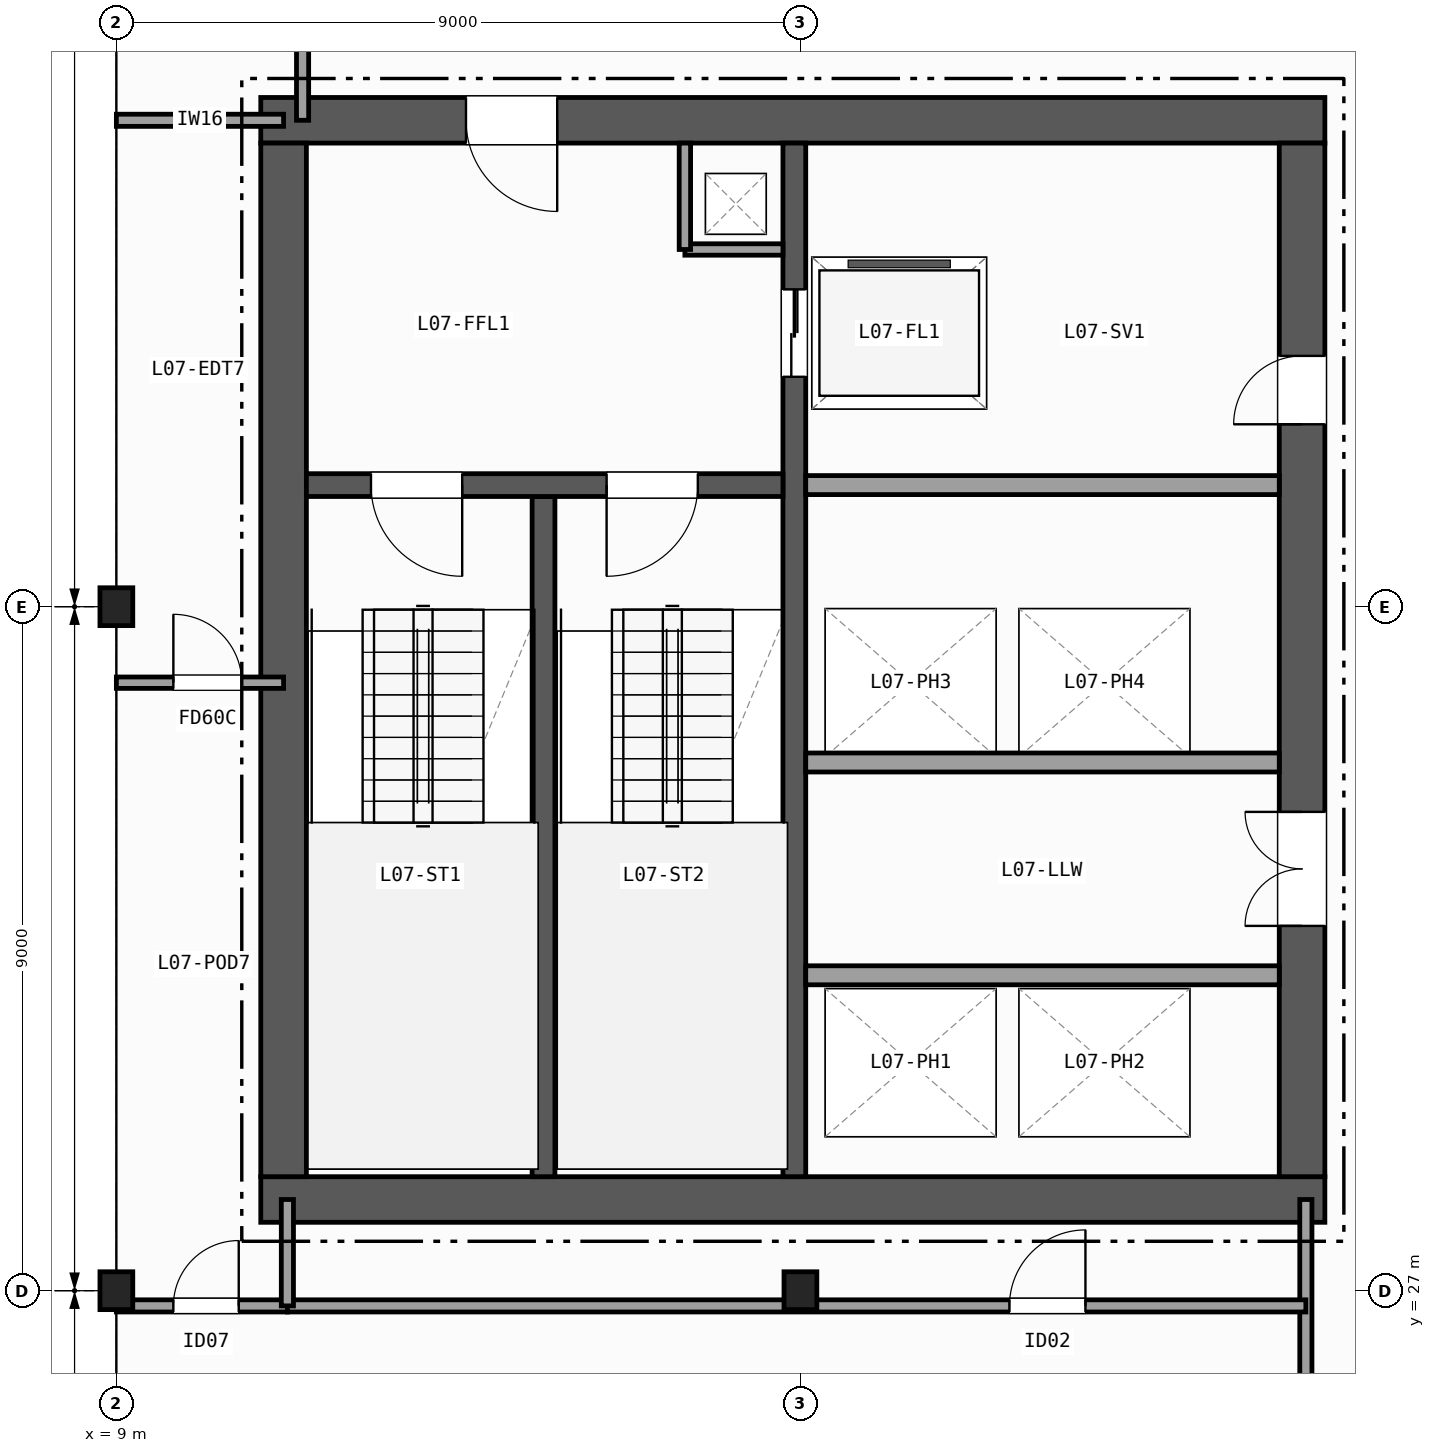
"""IFC4 building model, lengths in metres.
Left out: names, types, materials, properties, quantities, classifications, styles, units other than length and angle.
Written with IfcOpenShell. Run it as: python <this file> out.ifc"""

import sys

from ifc_helpers import new_model, si_unit, direction, frame, frame_2d, origin, origin_2d, place, context, subcontext, project, spatial, rectangle, i_section, extrude, element, fill, save


model = new_model("IFC4")
c1 = context("Model", 3, precision=1e-05, world=origin(), true_north=direction((0.0, 1.0)))
c2 = subcontext(c1, "Body", "Model", "MODEL_VIEW")
j1 = project(units=[si_unit("LENGTHUNIT", "METRE"), si_unit("PLANEANGLEUNIT", "RADIAN")], contexts=[c1])
p1 = place(None, origin())
s1 = spatial("IfcSite", under=j1, at=p1, CompositionType="ELEMENT")
p2 = place(p1, origin())
s2 = spatial("IfcBuilding", under=s1, at=p2, CompositionType="ELEMENT")
p3 = place(p2, frame((0.0, 0.0, 36.0)))
s3 = spatial("IfcBuildingStorey", under=s2, at=p3, CompositionType="ELEMENT", Elevation=36.0)
for number, where, z_axis, x_axis in (
    (1, (9.0, 27.0, 0.0), (0.0, 0.0, 1.0), (1.0, 0.0, 0.0)),
    (2, (9.0, 36.0, 0.0), (0.0, 0.0, 1.0), (1.0, 0.0, 0.0)),
    (3, (18.0, 27.0, 0.0), (0.0, 0.0, 1.0), (1.0, 0.0, 0.0)),
):
    element("IfcColumn", number, at=place(p3, frame(where, z_axis=z_axis, x_axis=x_axis)), inside=s3, PredefinedType="COLUMN", context=c2, shape_type="SweptSolid", body=[
        extrude(i_section(OverallWidth=0.432, OverallDepth=0.498, WebThickness=0.056, FlangeThickness=0.089, FilletRadius=0.015, at=origin_2d()), origin(), (0.0, 0.0, 1.0), 3.7),
    ])
p4 = place(p3, frame((10.9, 28.2, 0.0), z_axis=(0.0, 0.0, 1.0), x_axis=(1.0, 0.0, 0.0)))
e4 = element("IfcWall", 4, at=p4, inside=s3, PredefinedType="SHEAR", context=c2, shape_type="SweptSolid", body=[
    extrude(rectangle(XDim=14.0, YDim=0.6, at=frame_2d((7.0, 0.0))), origin(), (0.0, 0.0, 1.0), 3.42),
])
p5 = place(p3, frame((24.9, 42.4, 0.0), z_axis=(0.0, 0.0, 1.0), x_axis=(-1.0, 0.0, 0.0)))
e5 = element("IfcWall", 5, at=p5, inside=s3, PredefinedType="SHEAR", context=c2, shape_type="SweptSolid", body=[
    extrude(rectangle(XDim=14.0, YDim=0.6, at=frame_2d((7.0, 0.0))), origin(), (0.0, 0.0, 1.0), 3.42),
])
p6 = place(p5, frame((10.1, 0.0, 0.0)))
e6 = element("IfcOpeningElement", 6, at=p6, cuts=e5, PredefinedType="OPENING", context=c2, shape_type="SweptSolid", body=[
    extrude(rectangle(XDim=1.2, YDim=2.15, at=frame_2d((0.6, 1.075))), frame((0.0, 0.31, 0.0), z_axis=(0.0, -1.0, 0.0), x_axis=(1.0, 0.0, 0.0)), (0.0, 0.0, 1.0), 0.62),
])
p7 = place(p3, frame((11.2, 42.1, 0.0), z_axis=(0.0, 0.0, 1.0), x_axis=(0.0, -1.0, 0.0)))
e7 = element("IfcWall", 7, at=p7, inside=s3, PredefinedType="SHEAR", context=c2, shape_type="SweptSolid", body=[
    extrude(rectangle(XDim=13.6, YDim=0.6, at=frame_2d((6.8, 0.0))), origin(), (0.0, 0.0, 1.0), 3.42),
])
p8 = place(p3, frame((24.6, 28.5, 0.0), z_axis=(0.0, 0.0, 1.0), x_axis=(0.0, 1.0, 0.0)))
e8 = element("IfcWall", 8, at=p8, inside=s3, PredefinedType="SHEAR", context=c2, shape_type="SweptSolid", body=[
    extrude(rectangle(XDim=13.6, YDim=0.6, at=frame_2d((6.8, 0.0))), origin(), (0.0, 0.0, 1.0), 3.42),
])
p9 = place(p8, frame((3.3, 0.0, 0.0)))
e9 = element("IfcOpeningElement", 9, at=p9, cuts=e8, PredefinedType="OPENING", context=c2, shape_type="SweptSolid", body=[
    extrude(rectangle(XDim=1.5, YDim=2.2, at=frame_2d((0.75, 1.1))), frame((0.0, 0.31, 0.0), z_axis=(0.0, -1.0, 0.0), x_axis=(1.0, 0.0, 0.0)), (0.0, 0.0, 1.0), 0.62),
])
p10 = place(p8, frame((9.9, 0.0, 0.0)))
e10 = element("IfcOpeningElement", 10, at=p10, cuts=e8, PredefinedType="OPENING", context=c2, shape_type="SweptSolid", body=[
    extrude(rectangle(XDim=0.9, YDim=2.1, at=frame_2d((0.45, 1.05))), frame((0.0, 0.31, 0.0), z_axis=(0.0, -1.0, 0.0), x_axis=(1.0, 0.0, 0.0)), (0.0, 0.0, 1.0), 0.62),
])
p11 = place(p3, frame((14.62, 28.5, 0.0), z_axis=(0.0, 0.0, 1.0), x_axis=(0.0, 1.0, 0.0)))
e11 = element("IfcWall", 11, at=p11, inside=s3, PredefinedType="SHEAR", context=c2, shape_type="SweptSolid", body=[
    extrude(rectangle(XDim=8.95, YDim=0.3, at=frame_2d((4.475, 0.0))), origin(), (0.0, 0.0, 1.0), 3.42),
])
p12 = place(p3, frame((17.92, 42.1, 0.0), z_axis=(0.0, 0.0, 1.0), x_axis=(0.0, -1.0, 0.0)))
e12 = element("IfcWall", 12, at=p12, inside=s3, PredefinedType="SHEAR", context=c2, shape_type="SweptSolid", body=[
    extrude(rectangle(XDim=13.6, YDim=0.3, at=frame_2d((6.8, 0.0))), origin(), (0.0, 0.0, 1.0), 3.42),
])
p13 = place(p12, frame((1.925, 0.0, 0.0)))
e13 = element("IfcOpeningElement", 13, at=p13, cuts=e12, PredefinedType="OPENING", context=c2, shape_type="SweptSolid", body=[
    extrude(rectangle(XDim=1.15, YDim=2.15, at=frame_2d((0.575, 1.075))), frame((0.0, 0.16, 0.0), z_axis=(0.0, -1.0, 0.0), x_axis=(1.0, 0.0, 0.0)), (0.0, 0.0, 1.0), 0.32),
])
p14 = place(p3, frame((17.77, 37.6, 0.0), z_axis=(0.0, 0.0, 1.0), x_axis=(-1.0, 0.0, 0.0)))
e14 = element("IfcWall", 14, at=p14, inside=s3, PredefinedType="SHEAR", context=c2, shape_type="SweptSolid", body=[
    extrude(rectangle(XDim=6.27, YDim=0.3, at=frame_2d((3.135, 0.0))), origin(), (0.0, 0.0, 1.0), 3.42),
])
p15 = place(p14, frame((4.22, 0.0, 0.0)))
e15 = element("IfcOpeningElement", 15, at=p15, cuts=e14, PredefinedType="OPENING", context=c2, shape_type="SweptSolid", body=[
    extrude(rectangle(XDim=1.2, YDim=2.15, at=frame_2d((0.6, 1.075))), frame((0.0, 0.16, 0.0), z_axis=(0.0, -1.0, 0.0), x_axis=(1.0, 0.0, 0.0)), (0.0, 0.0, 1.0), 0.32),
])
p16 = place(p14, frame((1.12, 0.0, 0.0)))
e16 = element("IfcOpeningElement", 16, at=p16, cuts=e14, PredefinedType="OPENING", context=c2, shape_type="SweptSolid", body=[
    extrude(rectangle(XDim=1.2, YDim=2.15, at=frame_2d((0.6, 1.075))), frame((0.0, 0.16, 0.0), z_axis=(0.0, -1.0, 0.0), x_axis=(1.0, 0.0, 0.0)), (0.0, 0.0, 1.0), 0.32),
])
p17 = place(p3, frame((16.48, 40.7, 0.0), z_axis=(0.0, 0.0, 1.0), x_axis=(1.0, 0.0, 0.0)))
e17 = element("IfcWall", 17, at=p17, inside=s3, PredefinedType="PARTITIONING", context=c2, shape_type="SweptSolid", body=[
    extrude(rectangle(XDim=1.29, YDim=0.15, at=frame_2d((0.645, 0.0))), origin(), (0.0, 0.0, 1.0), 3.42),
])
p18 = place(p3, frame((16.48, 40.7, 0.0), z_axis=(0.0, 0.0, 1.0), x_axis=(0.0, 1.0, 0.0)))
e18 = element("IfcWall", 18, at=p18, inside=s3, PredefinedType="PARTITIONING", context=c2, shape_type="SweptSolid", body=[
    extrude(rectangle(XDim=1.4, YDim=0.15, at=frame_2d((0.7, 0.0))), origin(), (0.0, 0.0, 1.0), 3.42),
])
for number, where, z_axis, x_axis in (
    (19, (18.07, 37.6, 0.0), (0.0, 0.0, 1.0), (1.0, 0.0, 0.0)),
    (20, (18.07, 31.15, 0.0), (0.0, 0.0, 1.0), (1.0, 0.0, 0.0)),
    (21, (24.3, 33.95, 0.0), (0.0, 0.0, 1.0), (-1.0, 0.0, 0.0)),
):
    element("IfcWall", number, at=place(p3, frame(where, z_axis=z_axis, x_axis=x_axis)), inside=s3, PredefinedType="PARTITIONING", context=c2, shape_type="SweptSolid", body=[
        extrude(rectangle(XDim=6.23, YDim=0.25, at=frame_2d((3.115, 0.0))), origin(), (0.0, 0.0, 1.0), 3.42),
    ])
p19 = place(p3, frame((9.0, 26.8, 0.0), z_axis=(0.0, 0.0, 1.0), x_axis=(1.0, 0.0, 0.0)))
e22 = element("IfcWall", 22, at=p19, inside=s3, PredefinedType="PARTITIONING", context=c2, shape_type="SweptSolid", body=[
    extrude(rectangle(XDim=2.25, YDim=0.16, at=frame_2d((1.125, 0.0))), origin(), (0.0, 0.0, 1.0), 2.627),
])
p20 = place(p19, frame((0.75, 0.0, 0.0)))
e23 = element("IfcOpeningElement", 23, at=p20, cuts=e22, PredefinedType="OPENING", context=c2, shape_type="SweptSolid", body=[
    extrude(rectangle(XDim=0.86, YDim=2.05, at=frame_2d((0.43, 1.025))), frame((0.0, 0.09, 0.0), z_axis=(0.0, -1.0, 0.0), x_axis=(1.0, 0.0, 0.0)), (0.0, 0.0, 1.0), 0.18),
])
p21 = place(p3, frame((9.0, 42.4, 0.0), z_axis=(0.0, 0.0, 1.0), x_axis=(1.0, 0.0, 0.0)))
e24 = element("IfcWall", 24, at=p21, inside=s3, PredefinedType="PARTITIONING", context=c2, shape_type="SweptSolid", body=[
    extrude(rectangle(XDim=2.2, YDim=0.16, at=frame_2d((1.1, 0.0))), origin(), (0.0, 0.0, 1.0), 2.627),
])
p22 = place(p3, frame((11.45, 42.4, 0.0), z_axis=(0.0, 0.0, 1.0), x_axis=(0.0, 1.0, 0.0)))
e25 = element("IfcWall", 25, at=p22, inside=s3, PredefinedType="PARTITIONING", context=c2, shape_type="SweptSolid", body=[
    extrude(rectangle(XDim=2.1, YDim=0.16, at=frame_2d((1.05, 0.0))), origin(), (0.0, 0.0, 1.0), 3.42),
])
p23 = place(p3, frame((9.0, 35.0, 0.0), z_axis=(0.0, 0.0, 1.0), x_axis=(1.0, 0.0, 0.0)))
e26 = element("IfcWall", 26, at=p23, inside=s3, PredefinedType="PARTITIONING", context=c2, shape_type="SweptSolid", body=[
    extrude(rectangle(XDim=2.2, YDim=0.15, at=frame_2d((1.1, 0.0))), origin(), (0.0, 0.0, 1.0), 2.627),
])
p24 = place(p23, frame((0.75, 0.0, 0.0)))
e27 = element("IfcOpeningElement", 27, at=p24, cuts=e26, PredefinedType="OPENING", context=c2, shape_type="SweptSolid", body=[
    extrude(rectangle(XDim=0.9, YDim=2.1, at=frame_2d((0.45, 1.05))), frame((0.0, 0.085, 0.0), z_axis=(0.0, -1.0, 0.0), x_axis=(1.0, 0.0, 0.0)), (0.0, 0.0, 1.0), 0.17),
])
p25 = place(p3, frame((24.65, 9.0, 0.0), z_axis=(0.0, 0.0, 1.0), x_axis=(0.0, 1.0, 0.0)))
e28 = element("IfcWall", 28, at=p25, inside=s3, PredefinedType="PARTITIONING", context=c2, shape_type="SweptSolid", body=[
    extrude(rectangle(XDim=19.2, YDim=0.16, at=frame_2d((9.6, 0.0))), origin(), (0.0, 0.0, 1.0), 2.627),
])
p26 = place(p25, frame((2.55, 0.0, 0.0)))
e29 = element("IfcOpeningElement", 29, at=p26, cuts=e28, PredefinedType="OPENING", context=c2, shape_type="SweptSolid", body=[
    extrude(rectangle(XDim=1.05, YDim=2.15, at=frame_2d((0.525, 1.075))), frame((0.0, 0.09, 0.0), z_axis=(0.0, -1.0, 0.0), x_axis=(1.0, 0.0, 0.0)), (0.0, 0.0, 1.0), 0.18),
])
p27 = place(p25, frame((8.55, 0.0, 0.0)))
e30 = element("IfcOpeningElement", 30, at=p27, cuts=e28, PredefinedType="OPENING", context=c2, shape_type="SweptSolid", body=[
    extrude(rectangle(XDim=1.2, YDim=2.15, at=frame_2d((0.6, 1.075))), frame((0.0, 0.09, 0.0), z_axis=(0.0, -1.0, 0.0), x_axis=(1.0, 0.0, 0.0)), (0.0, 0.0, 1.0), 0.18),
])
p28 = place(p25, frame((13.44, 0.0, 0.0)))
e31 = element("IfcOpeningElement", 31, at=p28, cuts=e28, PredefinedType="OPENING", context=c2, shape_type="SweptSolid", body=[
    extrude(rectangle(XDim=0.86, YDim=2.05, at=frame_2d((0.43, 1.025))), frame((0.0, 0.09, 0.0), z_axis=(0.0, -1.0, 0.0), x_axis=(1.0, 0.0, 0.0)), (0.0, 0.0, 1.0), 0.18),
])
p29 = place(p3, frame((11.25, 26.8, 0.0), z_axis=(0.0, 0.0, 1.0), x_axis=(1.0, 0.0, 0.0)))
e32 = element("IfcWall", 32, at=p29, inside=s3, PredefinedType="PARTITIONING", context=c2, shape_type="SweptSolid", body=[
    extrude(rectangle(XDim=13.4, YDim=0.16, at=frame_2d((6.7, 0.0))), origin(), (0.0, 0.0, 1.0), 2.789),
])
p30 = place(p29, frame((9.5, 0.0, 0.0)))
e33 = element("IfcOpeningElement", 33, at=p30, cuts=e32, PredefinedType="OPENING", context=c2, shape_type="SweptSolid", body=[
    extrude(rectangle(XDim=1.0, YDim=2.1, at=frame_2d((0.5, 1.05))), frame((0.0, 0.09, 0.0), z_axis=(0.0, -1.0, 0.0), x_axis=(1.0, 0.0, 0.0)), (0.0, 0.0, 1.0), 0.18),
])
p31 = place(p3, frame((11.25, 26.8, 0.0), z_axis=(0.0, 0.0, 1.0), x_axis=(0.0, 1.0, 0.0)))
e34 = element("IfcWall", 34, at=p31, inside=s3, PredefinedType="PARTITIONING", context=c2, shape_type="SweptSolid", body=[
    extrude(rectangle(XDim=1.4, YDim=0.16, at=frame_2d((0.7, 0.0))), origin(), (0.0, 0.0, 1.0), 2.789),
])
p32 = place(p15, origin())
e35 = element("IfcDoor", 35, at=p32, inside=s3, OperationType="SINGLE_SWING_LEFT", PredefinedType="DOOR", context=c2, shape_type="SweptSolid", body=[
    extrude(rectangle(XDim=1.2, YDim=2.15, at=frame_2d((0.6, 1.075))), frame((0.0, 0.025, 0.0), z_axis=(0.0, -1.0, 0.0), x_axis=(1.0, 0.0, 0.0)), (0.0, 0.0, 1.0), 0.05),
])
fill(e15, e35)
p33 = place(p16, origin())
e36 = element("IfcDoor", 36, at=p33, inside=s3, OperationType="SINGLE_SWING_RIGHT", PredefinedType="DOOR", context=c2, shape_type="SweptSolid", body=[
    extrude(rectangle(XDim=1.2, YDim=2.15, at=frame_2d((0.6, 1.075))), frame((0.0, 0.025, 0.0), z_axis=(0.0, -1.0, 0.0), x_axis=(1.0, 0.0, 0.0)), (0.0, 0.0, 1.0), 0.05),
])
fill(e16, e36)
p34 = place(p9, origin())
e37 = element("IfcDoor", 37, at=p34, inside=s3, OperationType="DOUBLE_DOOR_SINGLE_SWING", PredefinedType="DOOR", context=c2, shape_type="SweptSolid", body=[
    extrude(rectangle(XDim=1.5, YDim=2.2, at=frame_2d((0.75, 1.1))), frame((0.0, 0.025, 0.0), z_axis=(0.0, -1.0, 0.0), x_axis=(1.0, 0.0, 0.0)), (0.0, 0.0, 1.0), 0.05),
])
fill(e9, e37)
p35 = place(p6, origin())
e38 = element("IfcDoor", 38, at=p35, inside=s3, OperationType="SINGLE_SWING_LEFT", PredefinedType="DOOR", context=c2, shape_type="SweptSolid", body=[
    extrude(rectangle(XDim=1.2, YDim=2.15, at=frame_2d((0.6, 1.075))), frame((0.0, 0.025, 0.0), z_axis=(0.0, -1.0, 0.0), x_axis=(1.0, 0.0, 0.0)), (0.0, 0.0, 1.0), 0.05),
])
fill(e6, e38)
p36 = place(p10, origin())
e39 = element("IfcDoor", 39, at=p36, inside=s3, OperationType="SINGLE_SWING_LEFT", PredefinedType="DOOR", context=c2, shape_type="SweptSolid", body=[
    extrude(rectangle(XDim=0.9, YDim=2.1, at=frame_2d((0.45, 1.05))), frame((0.0, 0.025, 0.0), z_axis=(0.0, -1.0, 0.0), x_axis=(1.0, 0.0, 0.0)), (0.0, 0.0, 1.0), 0.05),
])
fill(e10, e39)
p37 = place(p13, origin())
e40 = element("IfcDoor", 40, at=p37, inside=s3, OperationType="DOUBLE_DOOR_SLIDING", PredefinedType="DOOR", context=c2, shape_type="SweptSolid", body=[
    extrude(rectangle(XDim=1.15, YDim=2.15, at=frame_2d((0.575, 1.075))), frame((0.0, 0.025, 0.0), z_axis=(0.0, -1.0, 0.0), x_axis=(1.0, 0.0, 0.0)), (0.0, 0.0, 1.0), 0.05),
])
fill(e13, e40)
p38 = place(p20, origin())
e41 = element("IfcDoor", 41, at=p38, inside=s3, OperationType="SINGLE_SWING_RIGHT", PredefinedType="DOOR", context=c2, shape_type="SweptSolid", body=[
    extrude(rectangle(XDim=0.86, YDim=2.05, at=frame_2d((0.43, 1.025))), frame((0.0, 0.025, 0.0), z_axis=(0.0, -1.0, 0.0), x_axis=(1.0, 0.0, 0.0)), (0.0, 0.0, 1.0), 0.05),
])
fill(e23, e41)
p39 = place(p24, origin())
e42 = element("IfcDoor", 42, at=p39, inside=s3, OperationType="SINGLE_SWING_LEFT", PredefinedType="DOOR", context=c2, shape_type="SweptSolid", body=[
    extrude(rectangle(XDim=0.9, YDim=2.1, at=frame_2d((0.45, 1.05))), frame((0.0, 0.025, 0.0), z_axis=(0.0, -1.0, 0.0), x_axis=(1.0, 0.0, 0.0)), (0.0, 0.0, 1.0), 0.05),
])
fill(e27, e42)
p40 = place(p30, origin())
e43 = element("IfcDoor", 43, at=p40, inside=s3, OperationType="SINGLE_SWING_RIGHT", PredefinedType="DOOR", context=c2, shape_type="SweptSolid", body=[
    extrude(rectangle(XDim=1.0, YDim=2.1, at=frame_2d((0.5, 1.05))), frame((0.0, 0.025, 0.0), z_axis=(0.0, -1.0, 0.0), x_axis=(1.0, 0.0, 0.0)), (0.0, 0.0, 1.0), 0.05),
])
fill(e33, e43)
save(model, sys.argv[1])
